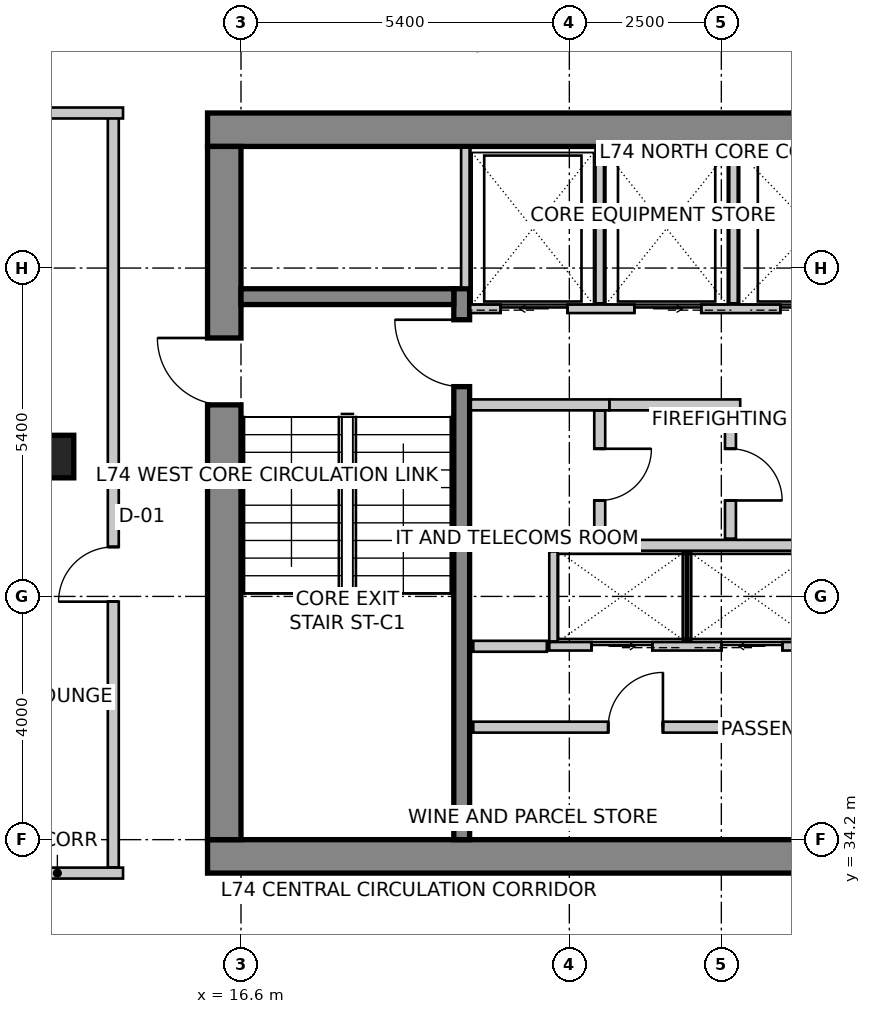
"""IFC4 building model, lengths in metres.
Left out: names, types, materials, properties, quantities, classifications, styles, units other than length and angle.
Written with IfcOpenShell. Run it as: python <this file> out.ifc"""

import sys

from ifc_helpers import new_model, si_unit, direction, frame, frame_2d, origin, origin_2d, place, context, subcontext, project, spatial, rectangle, extrude, source, transform, mapped, element, fill, save


model = new_model("IFC4")
c1 = context("Model", 3, precision=1e-05, world=origin(), true_north=direction((0.0, 1.0)))
c2 = subcontext(c1, "Body", "Model", "MODEL_VIEW")
j1 = project(units=[si_unit("LENGTHUNIT", "METRE"), si_unit("PLANEANGLEUNIT", "RADIAN")], contexts=[c1])
p1 = place(None, origin())
s1 = spatial("IfcSite", under=j1, at=p1, CompositionType="ELEMENT")
p2 = place(p1, origin())
s2 = spatial("IfcBuilding", under=s1, at=p2, CompositionType="ELEMENT")
p3 = place(p2, frame((0.0, 0.0, 288.9)))
s3 = spatial("IfcBuildingStorey", under=s2, at=p3, CompositionType="ELEMENT", Elevation=288.9)
p4 = place(p3, frame((16.05, 45.875, 0.0), z_axis=(0.0, 0.0, 1.0), x_axis=(1.0, 0.0, 0.0)))
e1 = element("IfcWall", 1, at=p4, inside=s3, PredefinedType="SHEAR", context=c2, shape_type="SweptSolid", body=[
    extrude(rectangle(XDim=15.5, YDim=0.55, at=frame_2d((7.75, 0.0))), origin(), (0.0, 0.0, 1.0), 3.6),
])
p5 = place(p3, frame((16.05, 33.925, 0.0), z_axis=(0.0, 0.0, 1.0), x_axis=(1.0, 0.0, 0.0)))
e2 = element("IfcWall", 2, at=p5, inside=s3, PredefinedType="SHEAR", context=c2, shape_type="SweptSolid", body=[
    extrude(rectangle(XDim=15.5, YDim=0.55, at=frame_2d((7.75, 0.0))), origin(), (0.0, 0.0, 1.0), 3.6),
])
m1 = source(origin(), c2, "Body", "SweptSolid", [
    extrude(rectangle(XDim=1.1, YDim=2.15, at=frame_2d((0.55, 1.075))), frame((0.0, 0.285, 0.0), z_axis=(0.0, -1.0, 0.0), x_axis=(1.0, 0.0, 0.0)), (0.0, 0.0, 1.0), 0.57),
])
p6 = place(p5, frame((9.98, 0.0, 0.0)))
e3 = element("IfcOpeningElement", 3, at=p6, cuts=e2, PredefinedType="OPENING", context=c2, shape_type="MappedRepresentation", body=[
    mapped(m1, transform((0.0, 0.0, 0.0), scale=1.0)),
])
p7 = place(p3, frame((16.325, 34.2, 0.0), z_axis=(0.0, 0.0, 1.0), x_axis=(0.0, 1.0, 0.0)))
e4 = element("IfcWall", 4, at=p7, inside=s3, PredefinedType="SHEAR", context=c2, shape_type="SweptSolid", body=[
    extrude(rectangle(XDim=11.4, YDim=0.55, at=frame_2d((5.7, 0.0))), origin(), (0.0, 0.0, 1.0), 3.6),
])
p8 = place(p7, frame((7.15, 0.0, 0.0)))
e5 = element("IfcOpeningElement", 5, at=p8, cuts=e4, PredefinedType="OPENING", context=c2, shape_type="MappedRepresentation", body=[
    mapped(m1, transform((0.0, 0.0, 0.0), scale=1.0)),
])
p9 = place(p3, frame((20.23, 34.2, 0.0), z_axis=(0.0, 0.0, 1.0), x_axis=(0.0, 1.0, 0.0)))
e6 = element("IfcWall", 6, at=p9, inside=s3, PredefinedType="SHEAR", context=c2, shape_type="SweptSolid", body=[
    extrude(rectangle(XDim=9.06, YDim=0.26, at=frame_2d((4.53, 0.0))), origin(), (0.0, 0.0, 1.0), 3.6),
])
m2 = source(origin(), c2, "Body", "SweptSolid", [
    extrude(rectangle(XDim=1.1, YDim=2.15, at=frame_2d((0.55, 1.075))), frame((0.0, 0.14, 0.0), z_axis=(0.0, -1.0, 0.0), x_axis=(1.0, 0.0, 0.0)), (0.0, 0.0, 1.0), 0.28),
])
p10 = place(p9, frame((7.45, 0.0, 0.0)))
e7 = element("IfcOpeningElement", 7, at=p10, cuts=e6, PredefinedType="OPENING", context=c2, shape_type="MappedRepresentation", body=[
    mapped(m2, transform((0.0, 0.0, 0.0), scale=1.0)),
])
p11 = place(p3, frame((16.6, 43.13, 0.0), z_axis=(0.0, 0.0, 1.0), x_axis=(1.0, 0.0, 0.0)))
e8 = element("IfcWall", 8, at=p11, inside=s3, PredefinedType="SHEAR", context=c2, shape_type="SweptSolid", body=[
    extrude(rectangle(XDim=3.5, YDim=0.26, at=frame_2d((1.75, 0.0))), origin(), (0.0, 0.0, 1.0), 3.6),
])
m3 = source(origin(), c2, "Body", "SweptSolid", [
    extrude(rectangle(XDim=0.7, YDim=0.7, at=origin_2d()), origin(), (0.0, 0.0, 1.0), 3.6),
])
p12 = place(p3, frame((13.5, 40.5, 0.0), z_axis=(0.0, 0.0, 1.0), x_axis=(1.0, 0.0, 0.0)))
e9 = element("IfcColumn", 9, at=p12, inside=s3, PredefinedType="COLUMN", context=c2, shape_type="MappedRepresentation", body=[
    mapped(m3, transform((0.0, 0.0, 0.0), scale=1.0)),
])
p13 = place(p3, frame((21.873, 52.741, 0.0), z_axis=(0.0, 0.0, 1.0), x_axis=(-0.843661487732, -0.536875492193, 0.0)))
e10 = element("IfcWall", 10, at=p13, inside=s3, PredefinedType="SOLIDWALL", context=c2, shape_type="SweptSolid", body=[
    extrude(rectangle(XDim=10.282, YDim=0.3, at=frame_2d((5.141, 0.0))), origin(), (0.0, 0.0, 1.0), 3.35),
])
m4 = source(origin(), c2, "Body", "SweptSolid", [
    extrude(rectangle(XDim=2.1, YDim=2.0, at=frame_2d((1.05, 1.0))), frame((0.0, 0.16, 0.0), z_axis=(0.0, -1.0, 0.0), x_axis=(1.0, 0.0, 0.0)), (0.0, 0.0, 1.0), 0.32),
])
p14 = place(p13, frame((1.41, 0.0, 0.85)))
e11 = element("IfcOpeningElement", 11, at=p14, cuts=e10, PredefinedType="OPENING", context=c2, shape_type="MappedRepresentation", body=[
    mapped(m4, transform((0.0, 0.0, 0.0), scale=1.0)),
])
m5 = source(origin(), c2, "Body", "SweptSolid", [
    extrude(rectangle(XDim=2.4, YDim=2.2, at=frame_2d((1.2, 1.1))), frame((0.0, 0.16, 0.0), z_axis=(0.0, -1.0, 0.0), x_axis=(1.0, 0.0, 0.0)), (0.0, 0.0, 1.0), 0.32),
])
p15 = place(p13, frame((5.539, 0.0, 0.85)))
e12 = element("IfcOpeningElement", 12, at=p15, cuts=e10, PredefinedType="OPENING", context=c2, shape_type="MappedRepresentation", body=[
    mapped(m5, transform((0.0, 0.0, 0.0), scale=1.0)),
])
p16 = place(p3, frame((20.37, 42.93, 0.0), z_axis=(0.0, 0.0, 1.0), x_axis=(1.0, 0.0, 0.0)))
e13 = element("IfcWall", 13, at=p16, inside=s3, PredefinedType="SOLIDWALL", context=c2, shape_type="SweptSolid", body=[
    extrude(rectangle(XDim=6.86, YDim=0.14, at=frame_2d((3.43, 0.0))), origin(), (0.0, 0.0, 1.0), 3.35),
])
m6 = source(origin(), c2, "Body", "SweptSolid", [
    extrude(rectangle(XDim=1.1, YDim=2.15, at=frame_2d((0.55, 1.075))), frame((0.0, 0.08, 0.0), z_axis=(0.0, -1.0, 0.0), x_axis=(1.0, 0.0, 0.0)), (0.0, 0.0, 1.0), 0.16),
])
p17 = place(p16, frame((0.5, 0.0, 0.0)))
e14 = element("IfcOpeningElement", 14, at=p17, cuts=e13, PredefinedType="OPENING", context=c2, shape_type="MappedRepresentation", body=[
    mapped(m6, transform((0.0, 0.0, 0.0), scale=1.0)),
])
p18 = place(p16, frame((2.7, 0.0, 0.0)))
e15 = element("IfcOpeningElement", 15, at=p18, cuts=e13, PredefinedType="OPENING", context=c2, shape_type="MappedRepresentation", body=[
    mapped(m6, transform((0.0, 0.0, 0.0), scale=1.0)),
])
p19 = place(p16, frame((5.1, 0.0, 0.0)))
e16 = element("IfcOpeningElement", 16, at=p19, cuts=e13, PredefinedType="OPENING", context=c2, shape_type="MappedRepresentation", body=[
    mapped(m6, transform((0.0, 0.0, 0.0), scale=1.0)),
])
p20 = place(p3, frame((20.29, 43.28, 0.0), z_axis=(0.0, 0.0, 1.0), x_axis=(0.0, 1.0, 0.0)))
e17 = element("IfcWall", 17, at=p20, inside=s3, PredefinedType="SOLIDWALL", context=c2, shape_type="SweptSolid", body=[
    extrude(rectangle(XDim=2.3, YDim=0.14, at=frame_2d((1.15, 0.0))), origin(), (0.0, 0.0, 1.0), 3.35),
])
for number, where, z_axis, x_axis in (
    (18, (22.5, 43.02, 0.0), (0.0, 0.0, 1.0), (0.0, 1.0, 0.0)),
    (19, (24.7, 43.02, 0.0), (0.0, 0.0, 1.0), (0.0, 1.0, 0.0)),
):
    element("IfcWall", number, at=place(p3, frame(where, z_axis=z_axis, x_axis=x_axis)), inside=s3, PredefinedType="SOLIDWALL", context=c2, shape_type="SweptSolid", body=[
        extrude(rectangle(XDim=2.56, YDim=0.14, at=frame_2d((1.28, 0.0))), origin(), (0.0, 0.0, 1.0), 3.35),
    ])
p21 = place(p3, frame((21.67, 37.38, 0.0), z_axis=(0.0, 0.0, 1.0), x_axis=(1.0, 0.0, 0.0)))
e20 = element("IfcWall", 20, at=p21, inside=s3, PredefinedType="SOLIDWALL", context=c2, shape_type="SweptSolid", body=[
    extrude(rectangle(XDim=4.46, YDim=0.14, at=frame_2d((2.23, 0.0))), origin(), (0.0, 0.0, 1.0), 3.35),
])
m7 = source(origin(), c2, "Body", "SweptSolid", [
    extrude(rectangle(XDim=1.0, YDim=2.15, at=frame_2d((0.5, 1.075))), frame((0.0, 0.08, 0.0), z_axis=(0.0, -1.0, 0.0), x_axis=(1.0, 0.0, 0.0)), (0.0, 0.0, 1.0), 0.16),
])
p22 = place(p21, frame((0.695, 0.0, 0.0)))
e21 = element("IfcOpeningElement", 21, at=p22, cuts=e20, PredefinedType="OPENING", context=c2, shape_type="MappedRepresentation", body=[
    mapped(m7, transform((0.0, 0.0, 0.0), scale=1.0)),
])
p23 = place(p21, frame((2.835, 0.0, 0.0)))
e22 = element("IfcOpeningElement", 22, at=p23, cuts=e20, PredefinedType="OPENING", context=c2, shape_type="MappedRepresentation", body=[
    mapped(m7, transform((0.0, 0.0, 0.0), scale=1.0)),
])
p24 = place(p3, frame((21.67, 39.04, 0.0), z_axis=(0.0, 0.0, 1.0), x_axis=(1.0, 0.0, 0.0)))
e23 = element("IfcWall", 23, at=p24, inside=s3, PredefinedType="SOLIDWALL", context=c2, shape_type="SweptSolid", body=[
    extrude(rectangle(XDim=4.46, YDim=0.18, at=frame_2d((2.23, 0.0))), origin(), (0.0, 0.0, 1.0), 3.35),
])
for number, where, z_axis, x_axis in (
    (24, (21.74, 37.46, 0.0), (0.0, 0.0, 1.0), (0.0, 1.0, 0.0)),
    (25, (23.935, 37.46, 0.0), (0.0, 0.0, 1.0), (0.0, 1.0, 0.0)),
):
    element("IfcWall", number, at=place(p3, frame(where, z_axis=z_axis, x_axis=x_axis)), inside=s3, PredefinedType="SOLIDWALL", context=c2, shape_type="SweptSolid", body=[
        extrude(rectangle(XDim=1.48, YDim=0.14, at=frame_2d((0.74, 0.0))), origin(), (0.0, 0.0, 1.0), 3.35),
    ])
p25 = place(p3, frame((22.66, 41.35, 0.0), z_axis=(0.0, 0.0, 1.0), x_axis=(-1.0, 0.0, 0.0)))
e26 = element("IfcWall", 26, at=p25, inside=s3, PredefinedType="PARTITIONING", context=c2, shape_type="SweptSolid", body=[
    extrude(rectangle(XDim=2.28, YDim=0.18, at=frame_2d((1.14, 0.0))), origin(), (0.0, 0.0, 1.0), 3.35),
])
p26 = place(p3, frame((24.81, 41.35, 0.0), z_axis=(0.0, 0.0, 1.0), x_axis=(-1.0, 0.0, 0.0)))
e27 = element("IfcWall", 27, at=p26, inside=s3, PredefinedType="PARTITIONING", context=c2, shape_type="SweptSolid", body=[
    extrude(rectangle(XDim=2.148, YDim=0.18, at=frame_2d((1.074, 0.0))), origin(), (0.0, 0.0, 1.0), 3.35),
])
p27 = place(p3, frame((22.5, 41.256, 0.0), z_axis=(0.0, 0.0, 1.0), x_axis=(0.0, -1.0, 0.0)))
e28 = element("IfcWall", 28, at=p27, inside=s3, PredefinedType="PARTITIONING", context=c2, shape_type="SweptSolid", body=[
    extrude(rectangle(XDim=2.106, YDim=0.18, at=frame_2d((1.053, 0.0))), origin(), (0.0, 0.0, 1.0), 3.35),
])
m8 = source(origin(), c2, "Body", "SweptSolid", [
    extrude(rectangle(XDim=0.85, YDim=2.15, at=frame_2d((0.425, 1.075))), frame((0.0, 0.1, 0.0), z_axis=(0.0, -1.0, 0.0), x_axis=(1.0, 0.0, 0.0)), (0.0, 0.0, 1.0), 0.2),
])
p28 = place(p27, frame((0.628, 0.0, 0.0)))
e29 = element("IfcOpeningElement", 29, at=p28, cuts=e28, PredefinedType="OPENING", context=c2, shape_type="MappedRepresentation", body=[
    mapped(m8, transform((0.0, 0.0, 0.0), scale=1.0)),
])
p29 = place(p3, frame((21.63, 37.38, 0.0), z_axis=(0.0, 0.0, 1.0), x_axis=(-1.0, 0.0, 0.0)))
e30 = element("IfcWall", 30, at=p29, inside=s3, PredefinedType="PARTITIONING", context=c2, shape_type="SweptSolid", body=[
    extrude(rectangle(XDim=1.21, YDim=0.18, at=frame_2d((0.605, 0.0))), origin(), (0.0, 0.0, 1.0), 3.35),
])
p30 = place(p3, frame((24.65, 41.256, 0.0), z_axis=(0.0, 0.0, 1.0), x_axis=(0.0, -1.0, 0.0)))
e31 = element("IfcWall", 31, at=p30, inside=s3, PredefinedType="PARTITIONING", context=c2, shape_type="SweptSolid", body=[
    extrude(rectangle(XDim=2.106, YDim=0.18, at=frame_2d((1.053, 0.0))), origin(), (0.0, 0.0, 1.0), 3.35),
])
p31 = place(p30, frame((0.628, 0.0, 0.0)))
e32 = element("IfcOpeningElement", 32, at=p31, cuts=e31, PredefinedType="OPENING", context=c2, shape_type="MappedRepresentation", body=[
    mapped(m8, transform((0.0, 0.0, 0.0), scale=1.0)),
])
p32 = place(p3, frame((20.42, 36.05, 0.0), z_axis=(0.0, 0.0, 1.0), x_axis=(1.0, 0.0, 0.0)))
e33 = element("IfcWall", 33, at=p32, inside=s3, PredefinedType="PARTITIONING", context=c2, shape_type="SweptSolid", body=[
    extrude(rectangle(XDim=5.46, YDim=0.18, at=frame_2d((2.73, 0.0))), origin(), (0.0, 0.0, 1.0), 3.35),
])
m9 = source(origin(), c2, "Body", "SweptSolid", [
    extrude(rectangle(XDim=0.9, YDim=2.15, at=frame_2d((0.45, 1.075))), frame((0.0, 0.1, 0.0), z_axis=(0.0, -1.0, 0.0), x_axis=(1.0, 0.0, 0.0)), (0.0, 0.0, 1.0), 0.2),
])
p33 = place(p32, frame((2.219, 0.0, 0.0)))
e34 = element("IfcOpeningElement", 34, at=p33, cuts=e33, PredefinedType="OPENING", context=c2, shape_type="MappedRepresentation", body=[
    mapped(m9, transform((0.0, 0.0, 0.0), scale=1.0)),
])
p34 = place(p3, frame((12.5, 33.65, 0.0), z_axis=(0.0, 0.0, 1.0), x_axis=(1.0, 0.0, 0.0)))
e35 = element("IfcWall", 35, at=p34, inside=s3, PredefinedType="PARTITIONING", context=c2, shape_type="SweptSolid", body=[
    extrude(rectangle(XDim=2.16, YDim=0.18, at=frame_2d((1.08, 0.0))), origin(), (0.0, 0.0, 1.0), 3.35),
])
p35 = place(p3, frame((14.5, 33.744, 0.0), z_axis=(0.0, 0.0, 1.0), x_axis=(0.0, 1.0, 0.0)))
e36 = element("IfcWall", 36, at=p35, inside=s3, PredefinedType="PARTITIONING", context=c2, shape_type="SweptSolid", body=[
    extrude(rectangle(XDim=12.406, YDim=0.18, at=frame_2d((6.203, 0.0))), origin(), (0.0, 0.0, 1.0), 3.35),
])
p36 = place(p35, frame((4.37, 0.0, 0.0)))
e37 = element("IfcOpeningElement", 37, at=p36, cuts=e36, PredefinedType="OPENING", context=c2, shape_type="MappedRepresentation", body=[
    mapped(m9, transform((0.0, 0.0, 0.0), scale=1.0)),
])
p37 = place(p3, frame((14.66, 46.15, 0.0), z_axis=(0.0, 0.0, 1.0), x_axis=(-1.0, 0.0, 0.0)))
e38 = element("IfcWall", 38, at=p37, inside=s3, PredefinedType="PARTITIONING", context=c2, shape_type="SweptSolid", body=[
    extrude(rectangle(XDim=1.602, YDim=0.18, at=frame_2d((0.801, 0.0))), origin(), (0.0, 0.0, 1.0), 3.35),
])
m10 = source(origin(), c2, "Body", "SweptSolid", [
    extrude(rectangle(XDim=1.1, YDim=2.15, at=frame_2d((0.55, 1.075))), frame((0.0, 0.025, 0.0), z_axis=(0.0, -1.0, 0.0), x_axis=(1.0, 0.0, 0.0)), (0.0, 0.0, 1.0), 0.05),
])
p38 = place(p17, origin())
e39 = element("IfcDoor", 39, at=p38, inside=s3, OperationType="SLIDING_TO_LEFT", PredefinedType="DOOR", context=c2, shape_type="MappedRepresentation", body=[
    mapped(m10, transform((0.0, 0.0, 0.0), scale=1.0)),
])
fill(e14, e39)
p39 = place(p18, origin())
e40 = element("IfcDoor", 40, at=p39, inside=s3, OperationType="SLIDING_TO_RIGHT", PredefinedType="DOOR", context=c2, shape_type="MappedRepresentation", body=[
    mapped(m10, transform((0.0, 0.0, 0.0), scale=1.0)),
])
fill(e15, e40)
m11 = source(origin(), c2, "Body", "SweptSolid", [
    extrude(rectangle(XDim=1.1, YDim=2.15, at=frame_2d((0.55, 1.075))), frame((0.0, 0.025, 0.0), z_axis=(0.0, -1.0, 0.0), x_axis=(1.0, 0.0, 0.0)), (0.0, 0.0, 1.0), 0.05),
])
p40 = place(p19, origin())
e41 = element("IfcDoor", 41, at=p40, inside=s3, OperationType="SLIDING_TO_LEFT", PredefinedType="DOOR", context=c2, shape_type="MappedRepresentation", body=[
    mapped(m11, transform((0.0, 0.0, 0.0), scale=1.0)),
])
fill(e16, e41)
m12 = source(origin(), c2, "Body", "SweptSolid", [
    extrude(rectangle(XDim=1.0, YDim=2.15, at=frame_2d((0.5, 1.075))), frame((0.0, 0.025, 0.0), z_axis=(0.0, -1.0, 0.0), x_axis=(1.0, 0.0, 0.0)), (0.0, 0.0, 1.0), 0.05),
])
p41 = place(p22, origin())
e42 = element("IfcDoor", 42, at=p41, inside=s3, OperationType="SLIDING_TO_RIGHT", PredefinedType="DOOR", context=c2, shape_type="MappedRepresentation", body=[
    mapped(m12, transform((0.0, 0.0, 0.0), scale=1.0)),
])
fill(e21, e42)
p42 = place(p23, origin())
e43 = element("IfcDoor", 43, at=p42, inside=s3, OperationType="SLIDING_TO_LEFT", PredefinedType="DOOR", context=c2, shape_type="MappedRepresentation", body=[
    mapped(m12, transform((0.0, 0.0, 0.0), scale=1.0)),
])
fill(e22, e43)
m13 = source(origin(), c2, "Body", "SweptSolid", [
    extrude(rectangle(XDim=1.1, YDim=2.15, at=frame_2d((0.55, 1.075))), frame((0.0, 0.025, 0.0), z_axis=(0.0, -1.0, 0.0), x_axis=(1.0, 0.0, 0.0)), (0.0, 0.0, 1.0), 0.05),
])
p43 = place(p10, origin())
e44 = element("IfcDoor", 44, at=p43, inside=s3, OperationType="SINGLE_SWING_RIGHT", PredefinedType="DOOR", context=c2, shape_type="MappedRepresentation", body=[
    mapped(m13, transform((0.0, 0.0, 0.0), scale=1.0)),
])
fill(e7, e44)
p44 = place(p8, origin())
e45 = element("IfcDoor", 45, at=p44, inside=s3, OperationType="SINGLE_SWING_RIGHT", PredefinedType="DOOR", context=c2, shape_type="MappedRepresentation", body=[
    mapped(m13, transform((0.0, 0.0, 0.0), scale=1.0)),
])
fill(e5, e45)
m14 = source(origin(), c2, "Body", "SweptSolid", [
    extrude(rectangle(XDim=0.85, YDim=2.15, at=frame_2d((0.425, 1.075))), frame((0.0, 0.025, 0.0), z_axis=(0.0, -1.0, 0.0), x_axis=(1.0, 0.0, 0.0)), (0.0, 0.0, 1.0), 0.05),
])
p45 = place(p28, origin())
e46 = element("IfcDoor", 46, at=p45, inside=s3, OperationType="SINGLE_SWING_LEFT", PredefinedType="DOOR", context=c2, shape_type="MappedRepresentation", body=[
    mapped(m14, transform((0.0, 0.0, 0.0), scale=1.0)),
])
fill(e29, e46)
p46 = place(p31, origin())
e47 = element("IfcDoor", 47, at=p46, inside=s3, OperationType="SINGLE_SWING_RIGHT", PredefinedType="DOOR", context=c2, shape_type="MappedRepresentation", body=[
    mapped(m14, transform((0.0, 0.0, 0.0), scale=1.0)),
])
fill(e32, e47)
m15 = source(origin(), c2, "Body", "SweptSolid", [
    extrude(rectangle(XDim=0.9, YDim=2.15, at=frame_2d((0.45, 1.075))), frame((0.0, 0.025, 0.0), z_axis=(0.0, -1.0, 0.0), x_axis=(1.0, 0.0, 0.0)), (0.0, 0.0, 1.0), 0.05),
])
p47 = place(p33, origin())
e48 = element("IfcDoor", 48, at=p47, inside=s3, OperationType="SINGLE_SWING_RIGHT", PredefinedType="DOOR", context=c2, shape_type="MappedRepresentation", body=[
    mapped(m15, transform((0.0, 0.0, 0.0), scale=1.0)),
])
fill(e34, e48)
m16 = source(origin(), c2, "Body", "SweptSolid", [
    extrude(rectangle(XDim=0.9, YDim=2.15, at=frame_2d((0.45, 1.075))), frame((0.0, 0.025, 0.0), z_axis=(0.0, -1.0, 0.0), x_axis=(1.0, 0.0, 0.0)), (0.0, 0.0, 1.0), 0.05),
])
p48 = place(p36, origin())
e49 = element("IfcDoor", 49, at=p48, inside=s3, OperationType="SINGLE_SWING_LEFT", PredefinedType="DOOR", context=c2, shape_type="MappedRepresentation", body=[
    mapped(m16, transform((0.0, 0.0, 0.0), scale=1.0)),
])
fill(e37, e49)
save(model, sys.argv[1])
